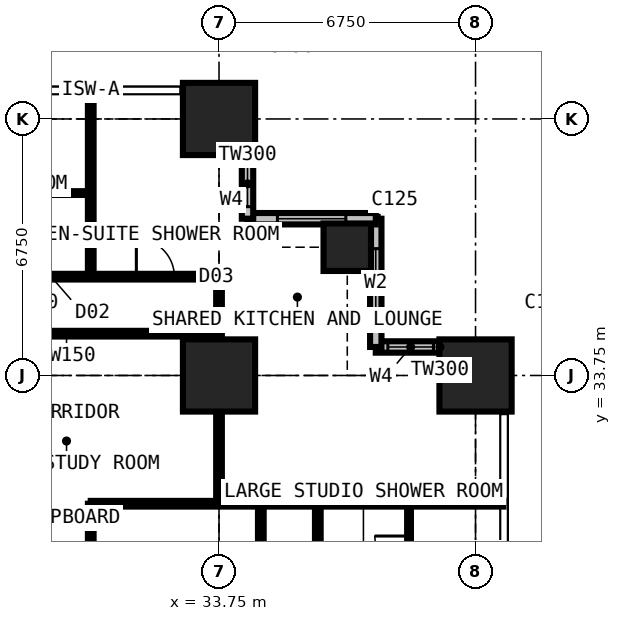
"""IFC4 building model, lengths in metres.
Left out: names, types, materials, properties, quantities, classifications, styles, units other than length and angle.
Written with IfcOpenShell. Run it as: python <this file> out.ifc"""

import sys

from ifc_helpers import new_model, si_unit, direction, frame, frame_2d, origin, origin_2d, place, context, subcontext, project, spatial, rectangle, extrude, element, fill, save


model = new_model("IFC4")
c1 = context("Model", 3, precision=1e-05, world=origin(), true_north=direction((0.0, 1.0)))
c2 = subcontext(c1, "Body", "Model", "MODEL_VIEW")
j1 = project(units=[si_unit("LENGTHUNIT", "METRE"), si_unit("PLANEANGLEUNIT", "RADIAN")], contexts=[c1])
p1 = place(None, origin())
s1 = spatial("IfcSite", under=j1, at=p1, CompositionType="ELEMENT")
p2 = place(p1, origin())
s2 = spatial("IfcBuilding", under=s1, at=p2, CompositionType="ELEMENT")
p3 = place(p2, frame((0.0, 0.0, 43.2)))
s3 = spatial("IfcBuildingStorey", under=s2, at=p3, CompositionType="ELEMENT", Elevation=43.2)
for number, where, z_axis, x_axis in (
    (1, (33.75, 33.75, 0.0), (0.0, 0.0, 1.0), (1.0, 0.0, 0.0)),
    (2, (33.75, 40.5, 0.0), (0.0, 0.0, 1.0), (1.0, 0.0, 0.0)),
):
    element("IfcColumn", number, at=place(p3, frame(where, z_axis=z_axis, x_axis=x_axis)), inside=s3, PredefinedType="COLUMN", context=c2, shape_type="SweptSolid", body=[
        extrude(rectangle(XDim=1.9, YDim=1.9, at=origin_2d()), origin(), (0.0, 0.0, 1.0), 3.6),
    ])
p4 = place(p3, frame((37.125, 37.125, 0.0), z_axis=(0.0, 0.0, 1.0), x_axis=(1.0, 0.0, 0.0)))
e3 = element("IfcColumn", 3, at=p4, inside=s3, PredefinedType="COLUMN", context=c2, shape_type="SweptSolid", body=[
    extrude(rectangle(XDim=1.25, YDim=1.25, at=origin_2d()), origin(), (0.0, 0.0, 1.0), 3.6),
])
p5 = place(p3, frame((40.5, 33.75, 0.0), z_axis=(0.0, 0.0, 1.0), x_axis=(1.0, 0.0, 0.0)))
e4 = element("IfcColumn", 4, at=p5, inside=s3, PredefinedType="COLUMN", context=c2, shape_type="SweptSolid", body=[
    extrude(rectangle(XDim=1.9, YDim=1.9, at=origin_2d()), origin(), (0.0, 0.0, 1.0), 3.6),
])
p6 = place(p3, frame((41.25, 34.5, 0.0), z_axis=(0.0, 0.0, 1.0), x_axis=(-1.0, 0.0, 0.0)))
e5 = element("IfcWall", 5, at=p6, inside=s3, PredefinedType="SOLIDWALL", context=c2, shape_type="SweptSolid", body=[
    extrude(rectangle(XDim=3.375, YDim=0.3, at=frame_2d((1.688, 0.0))), origin(), (0.0, 0.0, 1.0), 3.375),
])
p7 = place(p6, frame((1.857, 0.0, 0.9)))
e6 = element("IfcOpeningElement", 6, at=p7, cuts=e5, PredefinedType="OPENING", context=c2, shape_type="SweptSolid", body=[
    extrude(rectangle(XDim=1.2, YDim=1.8, at=frame_2d((0.6, 0.9))), frame((0.0, 0.16, 0.0), z_axis=(0.0, -1.0, 0.0), x_axis=(1.0, 0.0, 0.0)), (0.0, 0.0, 1.0), 0.32),
])
p8 = place(p3, frame((37.875, 34.5, 0.0), z_axis=(0.0, 0.0, 1.0), x_axis=(0.0, 1.0, 0.0)))
e7 = element("IfcWall", 7, at=p8, inside=s3, PredefinedType="SOLIDWALL", context=c2, shape_type="SweptSolid", body=[
    extrude(rectangle(XDim=3.375, YDim=0.3, at=frame_2d((1.688, 0.0))), origin(), (0.0, 0.0, 1.0), 3.375),
])
p9 = place(p8, frame((0.788, 0.0, 0.6)))
e8 = element("IfcOpeningElement", 8, at=p9, cuts=e7, PredefinedType="OPENING", context=c2, shape_type="SweptSolid", body=[
    extrude(rectangle(XDim=1.8, YDim=2.1, at=frame_2d((0.9, 1.05))), frame((0.0, 0.16, 0.0), z_axis=(0.0, -1.0, 0.0), x_axis=(1.0, 0.0, 0.0)), (0.0, 0.0, 1.0), 0.32),
])
p10 = place(p3, frame((37.875, 37.875, 0.0), z_axis=(0.0, 0.0, 1.0), x_axis=(-1.0, 0.0, 0.0)))
e9 = element("IfcWall", 9, at=p10, inside=s3, PredefinedType="SOLIDWALL", context=c2, shape_type="SweptSolid", body=[
    extrude(rectangle(XDim=3.375, YDim=0.3, at=frame_2d((1.688, 0.0))), origin(), (0.0, 0.0, 1.0), 3.375),
])
p11 = place(p10, frame((0.788, 0.0, 0.6)))
e10 = element("IfcOpeningElement", 10, at=p11, cuts=e9, PredefinedType="OPENING", context=c2, shape_type="SweptSolid", body=[
    extrude(rectangle(XDim=1.8, YDim=2.1, at=frame_2d((0.9, 1.05))), frame((0.0, 0.16, 0.0), z_axis=(0.0, -1.0, 0.0), x_axis=(1.0, 0.0, 0.0)), (0.0, 0.0, 1.0), 0.32),
])
p12 = place(p3, frame((34.5, 37.875, 0.0), z_axis=(0.0, 0.0, 1.0), x_axis=(0.0, 1.0, 0.0)))
e11 = element("IfcWall", 11, at=p12, inside=s3, PredefinedType="SOLIDWALL", context=c2, shape_type="SweptSolid", body=[
    extrude(rectangle(XDim=3.375, YDim=0.3, at=frame_2d((1.688, 0.0))), origin(), (0.0, 0.0, 1.0), 3.375),
])
p13 = place(p12, frame((0.317, 0.0, 0.9)))
e12 = element("IfcOpeningElement", 12, at=p13, cuts=e11, PredefinedType="OPENING", context=c2, shape_type="SweptSolid", body=[
    extrude(rectangle(XDim=1.2, YDim=1.8, at=frame_2d((0.6, 0.9))), frame((0.0, 0.16, 0.0), z_axis=(0.0, -1.0, 0.0), x_axis=(1.0, 0.0, 0.0)), (0.0, 0.0, 1.0), 0.32),
])
p14 = place(p3, frame((10.125, 36.35, 0.0), z_axis=(0.0, 0.0, 1.0), x_axis=(1.0, 0.0, 0.0)))
e13 = element("IfcWall", 13, at=p14, inside=s3, PredefinedType="PARTITIONING", context=c2, shape_type="SweptSolid", body=[
    extrude(rectangle(XDim=23.625, YDim=0.15, at=frame_2d((11.812, 0.0))), origin(), (0.0, 0.0, 1.0), 3.375),
])
p15 = place(p14, frame((21.45, 0.0, 0.0)))
e14 = element("IfcOpeningElement", 14, at=p15, cuts=e13, PredefinedType="OPENING", context=c2, shape_type="SweptSolid", body=[
    extrude(rectangle(XDim=1.0, YDim=2.2, at=frame_2d((0.5, 1.1))), frame((0.0, 0.085, 0.0), z_axis=(0.0, -1.0, 0.0), x_axis=(1.0, 0.0, 0.0)), (0.0, 0.0, 1.0), 0.17),
])
p16 = place(p14, frame((17.125, 0.0, 0.0)))
e15 = element("IfcOpeningElement", 15, at=p16, cuts=e13, PredefinedType="OPENING", context=c2, shape_type="SweptSolid", body=[
    extrude(rectangle(XDim=0.95, YDim=2.2, at=frame_2d((0.475, 1.1))), frame((0.0, 0.085, 0.0), z_axis=(0.0, -1.0, 0.0), x_axis=(1.0, 0.0, 0.0)), (0.0, 0.0, 1.0), 0.17),
])
p17 = place(p14, frame((13.7, 0.0, 0.0)))
e16 = element("IfcOpeningElement", 16, at=p17, cuts=e13, PredefinedType="OPENING", context=c2, shape_type="SweptSolid", body=[
    extrude(rectangle(XDim=0.95, YDim=2.2, at=frame_2d((0.475, 1.1))), frame((0.0, 0.085, 0.0), z_axis=(0.0, -1.0, 0.0), x_axis=(1.0, 0.0, 0.0)), (0.0, 0.0, 1.0), 0.17),
])
p18 = place(p14, frame((4.2, 0.0, 0.0)))
e17 = element("IfcOpeningElement", 17, at=p18, cuts=e13, PredefinedType="OPENING", context=c2, shape_type="SweptSolid", body=[
    extrude(rectangle(XDim=0.95, YDim=2.2, at=frame_2d((0.475, 1.1))), frame((0.0, 0.085, 0.0), z_axis=(0.0, -1.0, 0.0), x_axis=(1.0, 0.0, 0.0)), (0.0, 0.0, 1.0), 0.17),
])
p19 = place(p14, frame((10.95, 0.0, 0.0)))
e18 = element("IfcOpeningElement", 18, at=p19, cuts=e13, PredefinedType="OPENING", context=c2, shape_type="SweptSolid", body=[
    extrude(rectangle(XDim=0.95, YDim=2.2, at=frame_2d((0.475, 1.1))), frame((0.0, 0.085, 0.0), z_axis=(0.0, -1.0, 0.0), x_axis=(1.0, 0.0, 0.0)), (0.0, 0.0, 1.0), 0.17),
])
p20 = place(p3, frame((25.725, 34.85, 0.0), z_axis=(0.0, 0.0, 1.0), x_axis=(1.0, 0.0, 0.0)))
e19 = element("IfcWall", 19, at=p20, inside=s3, PredefinedType="PARTITIONING", context=c2, shape_type="SweptSolid", body=[
    extrude(rectangle(XDim=8.025, YDim=0.15, at=frame_2d((4.012, 0.0))), origin(), (0.0, 0.0, 1.0), 3.375),
])
p21 = place(p3, frame((28.375, 38.55, 0.0), z_axis=(0.0, 0.0, 1.0), x_axis=(1.0, 0.0, 0.0)))
e20 = element("IfcWall", 20, at=p21, inside=s3, PredefinedType="PARTITIONING", context=c2, shape_type="SweptSolid", body=[
    extrude(rectangle(XDim=2.0, YDim=0.1, at=frame_2d((1.0, 0.0))), origin(), (0.0, 0.0, 1.0), 3.375),
])
p22 = place(p3, frame((30.375, 29.2, 0.0), z_axis=(0.0, 0.0, 1.0), x_axis=(0.0, 1.0, 0.0)))
e21 = element("IfcWall", 21, at=p22, inside=s3, PredefinedType="PARTITIONING", context=c2, shape_type="SweptSolid", body=[
    extrude(rectangle(XDim=1.175, YDim=0.15, at=frame_2d((0.587, 0.0))), origin(), (0.0, 0.0, 1.0), 3.375),
])
p23 = place(p3, frame((30.375, 30.375, 0.0), z_axis=(0.0, 0.0, 1.0), x_axis=(1.0, 0.0, 0.0)))
e22 = element("IfcWall", 22, at=p23, inside=s3, PredefinedType="PARTITIONING", context=c2, shape_type="SweptSolid", body=[
    extrude(rectangle(XDim=10.859, YDim=0.15, at=frame_2d((5.429, 0.0))), origin(), (0.0, 0.0, 1.0), 3.375),
])
p24 = place(p3, frame((30.375, 36.35, 0.0), z_axis=(0.0, 0.0, 1.0), x_axis=(0.0, 1.0, 0.0)))
e23 = element("IfcWall", 23, at=p24, inside=s3, PredefinedType="PARTITIONING", context=c2, shape_type="SweptSolid", body=[
    extrude(rectangle(XDim=4.884, YDim=0.15, at=frame_2d((2.442, 0.0))), origin(), (0.0, 0.0, 1.0), 3.375),
])
p25 = place(p3, frame((33.75, 30.375, 0.0), z_axis=(0.0, 0.0, 1.0), x_axis=(0.0, 1.0, 0.0)))
e24 = element("IfcWall", 24, at=p25, inside=s3, PredefinedType="PARTITIONING", context=c2, shape_type="SweptSolid", body=[
    extrude(rectangle(XDim=5.975, YDim=0.15, at=frame_2d((2.988, 0.0))), origin(), (0.0, 0.0, 1.0), 2.877),
])
p26 = place(p3, frame((34.85, 12.55, 0.0), z_axis=(0.0, 0.0, 1.0), x_axis=(0.0, 1.0, 0.0)))
e25 = element("IfcWall", 25, at=p26, inside=s3, PredefinedType="PARTITIONING", context=c2, shape_type="SweptSolid", body=[
    extrude(rectangle(XDim=17.825, YDim=0.15, at=frame_2d((8.913, 0.0))), origin(), (0.0, 0.0, 1.0), 3.375),
])
p27 = place(p26, frame((8.65, 0.0, 0.0)))
e26 = element("IfcOpeningElement", 26, at=p27, cuts=e25, PredefinedType="OPENING", context=c2, shape_type="SweptSolid", body=[
    extrude(rectangle(XDim=0.95, YDim=2.2, at=frame_2d((0.475, 1.1))), frame((0.0, 0.085, 0.0), z_axis=(0.0, -1.0, 0.0), x_axis=(1.0, 0.0, 0.0)), (0.0, 0.0, 1.0), 0.17),
])
p28 = place(p3, frame((36.35, 6.75, 0.0), z_axis=(0.0, 0.0, 1.0), x_axis=(0.0, 1.0, 0.0)))
e27 = element("IfcWall", 27, at=p28, inside=s3, PredefinedType="PARTITIONING", context=c2, shape_type="SweptSolid", body=[
    extrude(rectangle(XDim=23.625, YDim=0.15, at=frame_2d((11.812, 0.0))), origin(), (0.0, 0.0, 1.0), 3.375),
])
p29 = place(p28, frame((0.2, 0.0, 0.0)))
e28 = element("IfcOpeningElement", 28, at=p29, cuts=e27, PredefinedType="OPENING", context=c2, shape_type="SweptSolid", body=[
    extrude(rectangle(XDim=0.95, YDim=2.2, at=frame_2d((0.475, 1.1))), frame((0.0, 0.085, 0.0), z_axis=(0.0, -1.0, 0.0), x_axis=(1.0, 0.0, 0.0)), (0.0, 0.0, 1.0), 0.17),
])
p30 = place(p28, frame((18.475, 0.0, 0.0)))
e29 = element("IfcOpeningElement", 29, at=p30, cuts=e27, PredefinedType="OPENING", context=c2, shape_type="SweptSolid", body=[
    extrude(rectangle(XDim=0.95, YDim=2.2, at=frame_2d((0.475, 1.1))), frame((0.0, 0.085, 0.0), z_axis=(0.0, -1.0, 0.0), x_axis=(1.0, 0.0, 0.0)), (0.0, 0.0, 1.0), 0.17),
])
p31 = place(p28, frame((11.725, 0.0, 0.0)))
e30 = element("IfcOpeningElement", 30, at=p31, cuts=e27, PredefinedType="OPENING", context=c2, shape_type="SweptSolid", body=[
    extrude(rectangle(XDim=0.95, YDim=2.2, at=frame_2d((0.475, 1.1))), frame((0.0, 0.085, 0.0), z_axis=(0.0, -1.0, 0.0), x_axis=(1.0, 0.0, 0.0)), (0.0, 0.0, 1.0), 0.17),
])
p32 = place(p28, frame((4.975, 0.0, 0.0)))
e31 = element("IfcOpeningElement", 31, at=p32, cuts=e27, PredefinedType="OPENING", context=c2, shape_type="SweptSolid", body=[
    extrude(rectangle(XDim=0.95, YDim=2.2, at=frame_2d((0.475, 1.1))), frame((0.0, 0.085, 0.0), z_axis=(0.0, -1.0, 0.0), x_axis=(1.0, 0.0, 0.0)), (0.0, 0.0, 1.0), 0.17),
])
p33 = place(p3, frame((38.75, 27.775, 0.0), z_axis=(0.0, 0.0, 1.0), x_axis=(0.0, 1.0, 0.0)))
e32 = element("IfcWall", 32, at=p33, inside=s3, PredefinedType="PARTITIONING", context=c2, shape_type="SweptSolid", body=[
    extrude(rectangle(XDim=2.6, YDim=0.1, at=frame_2d((1.3, 0.0))), origin(), (0.0, 0.0, 1.0), 3.375),
])
p34 = place(p33, frame((0.85, 0.0, 0.0)))
e33 = element("IfcOpeningElement", 33, at=p34, cuts=e32, PredefinedType="OPENING", context=c2, shape_type="SweptSolid", body=[
    extrude(rectangle(XDim=0.9, YDim=2.2, at=frame_2d((0.45, 1.1))), frame((0.0, 0.06, 0.0), z_axis=(0.0, -1.0, 0.0), x_axis=(1.0, 0.0, 0.0)), (0.0, 0.0, 1.0), 0.12),
])
p35 = place(p7, origin())
e34 = element("IfcWindow", 34, at=p35, inside=s3, PartitioningType="SINGLE_PANEL", PredefinedType="WINDOW", context=c2, shape_type="SweptSolid", body=[
    extrude(rectangle(XDim=1.2, YDim=1.8, at=frame_2d((0.6, 0.9))), frame((0.0, 0.03, 0.0), z_axis=(0.0, -1.0, 0.0), x_axis=(1.0, 0.0, 0.0)), (0.0, 0.0, 1.0), 0.06),
])
fill(e6, e34)
p36 = place(p9, origin())
e35 = element("IfcWindow", 35, at=p36, inside=s3, PartitioningType="SINGLE_PANEL", PredefinedType="WINDOW", context=c2, shape_type="SweptSolid", body=[
    extrude(rectangle(XDim=1.8, YDim=2.1, at=frame_2d((0.9, 1.05))), frame((0.0, 0.03, 0.0), z_axis=(0.0, -1.0, 0.0), x_axis=(1.0, 0.0, 0.0)), (0.0, 0.0, 1.0), 0.06),
])
fill(e8, e35)
p37 = place(p11, origin())
e36 = element("IfcWindow", 36, at=p37, inside=s3, PartitioningType="SINGLE_PANEL", PredefinedType="WINDOW", context=c2, shape_type="SweptSolid", body=[
    extrude(rectangle(XDim=1.8, YDim=2.1, at=frame_2d((0.9, 1.05))), frame((0.0, 0.03, 0.0), z_axis=(0.0, -1.0, 0.0), x_axis=(1.0, 0.0, 0.0)), (0.0, 0.0, 1.0), 0.06),
])
fill(e10, e36)
p38 = place(p13, origin())
e37 = element("IfcWindow", 37, at=p38, inside=s3, PartitioningType="SINGLE_PANEL", PredefinedType="WINDOW", context=c2, shape_type="SweptSolid", body=[
    extrude(rectangle(XDim=1.2, YDim=1.8, at=frame_2d((0.6, 0.9))), frame((0.0, 0.03, 0.0), z_axis=(0.0, -1.0, 0.0), x_axis=(1.0, 0.0, 0.0)), (0.0, 0.0, 1.0), 0.06),
])
fill(e12, e37)
p39 = place(p34, origin())
e38 = element("IfcDoor", 38, at=p39, inside=s3, OperationType="SINGLE_SWING_RIGHT", PredefinedType="DOOR", context=c2, shape_type="SweptSolid", body=[
    extrude(rectangle(XDim=0.9, YDim=2.2, at=frame_2d((0.45, 1.1))), frame((0.0, 0.025, 0.0), z_axis=(0.0, -1.0, 0.0), x_axis=(1.0, 0.0, 0.0)), (0.0, 0.0, 1.0), 0.05),
])
fill(e33, e38)
p40 = place(p15, origin())
e39 = element("IfcDoor", 39, at=p40, inside=s3, OperationType="SINGLE_SWING_LEFT", PredefinedType="DOOR", context=c2, shape_type="SweptSolid", body=[
    extrude(rectangle(XDim=1.0, YDim=2.2, at=frame_2d((0.5, 1.1))), frame((0.0, 0.025, 0.0), z_axis=(0.0, -1.0, 0.0), x_axis=(1.0, 0.0, 0.0)), (0.0, 0.0, 1.0), 0.05),
])
fill(e14, e39)
save(model, sys.argv[1])
